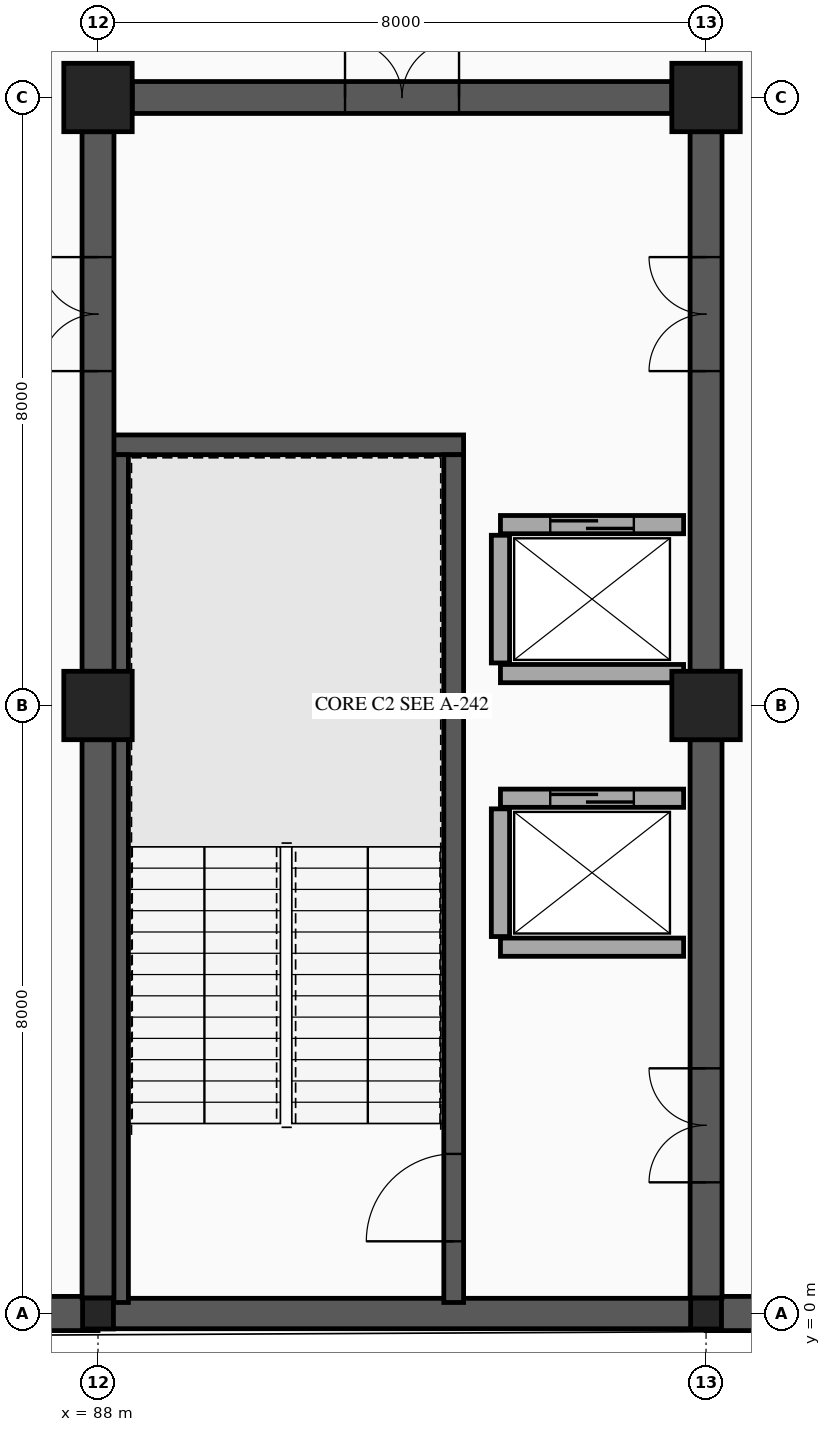
"""IFC4 building model, lengths in metres.
Left out: names, types, materials, properties, quantities, classifications, styles, units other than length and angle.
Written with IfcOpenShell. Run it as: python <this file> out.ifc"""

import sys

from ifc_helpers import new_model, si_unit, direction, frame, frame_2d, origin, origin_2d, place, context, subcontext, project, spatial, rectangle, hollow_rectangle, extrude, element, fill, save


model = new_model("IFC4")
c1 = context("Model", 3, precision=1e-05, world=origin(), true_north=direction((0.0, 1.0)))
c2 = subcontext(c1, "Body", "Model", "MODEL_VIEW")
j1 = project(units=[si_unit("LENGTHUNIT", "METRE"), si_unit("PLANEANGLEUNIT", "RADIAN")], contexts=[c1])
p1 = place(None, origin())
s1 = spatial("IfcSite", under=j1, at=p1, CompositionType="ELEMENT")
p2 = place(p1, origin())
s2 = spatial("IfcBuilding", under=s1, at=p2, CompositionType="ELEMENT")
p3 = place(p2, frame((0.0, 0.0, -4.8)))
s3 = spatial("IfcBuildingStorey", under=s2, at=p3, CompositionType="ELEMENT", Elevation=-4.8)
p4 = place(p3, frame((88.0, 0.0, 0.0), z_axis=(0.0, 0.0, 1.0), x_axis=(1.0, 0.0, 0.0)))
e1 = element("IfcColumn", 1, at=p4, inside=s3, PredefinedType="COLUMN", context=c2, shape_type="SweptSolid", body=[
    extrude(hollow_rectangle(XDim=0.406, YDim=0.406, WallThickness=0.015, InnerFilletRadius=0.015, OuterFilletRadius=0.029, at=origin_2d()), origin(), (0.0, 0.0, 1.0), 4.8),
])
for number, where, z_axis, x_axis in (
    (2, (88.0, 8.0, 0.0), (0.0, 0.0, 1.0), (1.0, 0.0, 0.0)),
    (3, (88.0, 16.0, 0.0), (0.0, 0.0, 1.0), (1.0, 0.0, 0.0)),
):
    element("IfcColumn", number, at=place(p3, frame(where, z_axis=z_axis, x_axis=x_axis)), inside=s3, PredefinedType="COLUMN", context=c2, shape_type="SweptSolid", body=[
        extrude(rectangle(XDim=0.9, YDim=0.9, at=origin_2d()), origin(), (0.0, 0.0, 1.0), 4.8),
    ])
p5 = place(p3, frame((96.0, 0.0, 0.0), z_axis=(0.0, 0.0, 1.0), x_axis=(1.0, 0.0, 0.0)))
e4 = element("IfcColumn", 4, at=p5, inside=s3, PredefinedType="COLUMN", context=c2, shape_type="SweptSolid", body=[
    extrude(hollow_rectangle(XDim=0.406, YDim=0.406, WallThickness=0.015, InnerFilletRadius=0.015, OuterFilletRadius=0.029, at=origin_2d()), origin(), (0.0, 0.0, 1.0), 4.8),
])
for number, where, z_axis, x_axis in (
    (5, (96.0, 8.0, 0.0), (0.0, 0.0, 1.0), (1.0, 0.0, 0.0)),
    (6, (96.0, 16.0, 0.0), (0.0, 0.0, 1.0), (1.0, 0.0, 0.0)),
):
    element("IfcColumn", number, at=place(p3, frame(where, z_axis=z_axis, x_axis=x_axis)), inside=s3, PredefinedType="COLUMN", context=c2, shape_type="SweptSolid", body=[
        extrude(rectangle(XDim=0.9, YDim=0.9, at=origin_2d()), origin(), (0.0, 0.0, 1.0), 4.8),
    ])
p6 = place(p3, frame((104.0, 0.0, 0.0), z_axis=(0.0, 0.0, 1.0), x_axis=(-1.0, 0.0, 0.0)))
e7 = element("IfcWall", 7, at=p6, inside=s3, PredefinedType="USERDEFINED", context=c2, shape_type="SweptSolid", body=[
    extrude(rectangle(XDim=8.0, YDim=0.45, at=frame_2d((4.0, 0.0))), origin(), (0.0, 0.0, 1.0), 4.5),
])
p7 = place(p3, frame((96.0, 0.0, 0.0), z_axis=(0.0, 0.0, 1.0), x_axis=(-1.0, 0.0, 0.0)))
e8 = element("IfcWall", 8, at=p7, inside=s3, PredefinedType="USERDEFINED", context=c2, shape_type="SweptSolid", body=[
    extrude(rectangle(XDim=8.0, YDim=0.4, at=frame_2d((4.0, 0.0))), origin(), (0.0, 0.0, 1.0), 4.5),
])
p8 = place(p3, frame((88.0, 0.0, 0.0), z_axis=(0.0, 0.0, 1.0), x_axis=(-1.0, 0.0, 0.0)))
e9 = element("IfcWall", 9, at=p8, inside=s3, PredefinedType="USERDEFINED", context=c2, shape_type="SweptSolid", body=[
    extrude(rectangle(XDim=8.0, YDim=0.45, at=frame_2d((4.0, 0.0))), origin(), (0.0, 0.0, 1.0), 4.5),
])
p9 = place(p3, frame((88.14, 11.43, 0.0), z_axis=(0.0, 0.0, 1.0), x_axis=(1.0, 0.0, 0.0)))
e10 = element("IfcWall", 10, at=p9, inside=s3, PredefinedType="SHEAR", context=c2, shape_type="SweptSolid", body=[
    extrude(rectangle(XDim=4.67, YDim=0.26, at=frame_2d((2.335, 0.0))), origin(), (0.0, 0.0, 1.0), 4.58),
])
p10 = place(p3, frame((88.27, 0.145, 0.0), z_axis=(0.0, 0.0, 1.0), x_axis=(0.0, 1.0, 0.0)))
e11 = element("IfcWall", 11, at=p10, inside=s3, PredefinedType="SHEAR", context=c2, shape_type="SweptSolid", body=[
    extrude(rectangle(XDim=11.155, YDim=0.26, at=frame_2d((5.578, 0.0))), origin(), (0.0, 0.0, 1.0), 4.58),
])
p11 = place(p3, frame((92.68, 0.145, 0.0), z_axis=(0.0, 0.0, 1.0), x_axis=(0.0, 1.0, 0.0)))
e12 = element("IfcWall", 12, at=p11, inside=s3, PredefinedType="SHEAR", context=c2, shape_type="SweptSolid", body=[
    extrude(rectangle(XDim=11.155, YDim=0.26, at=frame_2d((5.578, 0.0))), origin(), (0.0, 0.0, 1.0), 4.58),
])
p12 = place(p11, frame((0.805, 0.0, 0.0)))
e13 = element("IfcOpeningElement", 13, at=p12, cuts=e12, PredefinedType="OPENING", context=c2, shape_type="SweptSolid", body=[
    extrude(rectangle(XDim=1.15, YDim=2.15, at=frame_2d((0.575, 1.075))), frame((0.0, 0.14, 0.0), z_axis=(0.0, -1.0, 0.0), x_axis=(1.0, 0.0, 0.0)), (0.0, 0.0, 1.0), 0.28),
])
p13 = place(p3, frame((88.45, 16.0, 0.0), z_axis=(0.0, 0.0, 1.0), x_axis=(1.0, 0.0, 0.0)))
e14 = element("IfcWall", 14, at=p13, inside=s3, PredefinedType="SHEAR", context=c2, shape_type="SweptSolid", body=[
    extrude(rectangle(XDim=7.1, YDim=0.42, at=frame_2d((3.55, 0.0))), origin(), (0.0, 0.0, 1.0), 4.58),
])
p14 = place(p13, frame((2.8, 0.0, 0.0)))
e15 = element("IfcOpeningElement", 15, at=p14, cuts=e14, PredefinedType="OPENING", context=c2, shape_type="SweptSolid", body=[
    extrude(rectangle(XDim=1.5, YDim=2.15, at=frame_2d((0.75, 1.075))), frame((0.0, 0.22, 0.0), z_axis=(0.0, -1.0, 0.0), x_axis=(1.0, 0.0, 0.0)), (0.0, 0.0, 1.0), 0.44),
])
p15 = place(p3, frame((88.0, 0.203, 0.0), z_axis=(0.0, 0.0, 1.0), x_axis=(0.0, 1.0, 0.0)))
e16 = element("IfcWall", 16, at=p15, inside=s3, PredefinedType="SHEAR", context=c2, shape_type="SweptSolid", body=[
    extrude(rectangle(XDim=7.347, YDim=0.42, at=frame_2d((3.674, 0.0))), origin(), (0.0, 0.0, 1.0), 4.58),
])
p16 = place(p3, frame((88.0, 8.45, 0.0), z_axis=(0.0, 0.0, 1.0), x_axis=(0.0, 1.0, 0.0)))
e17 = element("IfcWall", 17, at=p16, inside=s3, PredefinedType="SHEAR", context=c2, shape_type="SweptSolid", body=[
    extrude(rectangle(XDim=7.1, YDim=0.42, at=frame_2d((3.55, 0.0))), origin(), (0.0, 0.0, 1.0), 4.58),
])
p17 = place(p16, frame((3.95, 0.0, 0.0)))
e18 = element("IfcOpeningElement", 18, at=p17, cuts=e17, PredefinedType="OPENING", context=c2, shape_type="SweptSolid", body=[
    extrude(rectangle(XDim=1.5, YDim=2.15, at=frame_2d((0.75, 1.075))), frame((0.0, 0.22, 0.0), z_axis=(0.0, -1.0, 0.0), x_axis=(1.0, 0.0, 0.0)), (0.0, 0.0, 1.0), 0.44),
])
p18 = place(p3, frame((96.0, 0.203, 0.0), z_axis=(0.0, 0.0, 1.0), x_axis=(0.0, 1.0, 0.0)))
e19 = element("IfcWall", 19, at=p18, inside=s3, PredefinedType="SHEAR", context=c2, shape_type="SweptSolid", body=[
    extrude(rectangle(XDim=7.347, YDim=0.42, at=frame_2d((3.674, 0.0))), origin(), (0.0, 0.0, 1.0), 4.58),
])
p19 = place(p18, frame((1.523, 0.0, 0.0)))
e20 = element("IfcOpeningElement", 20, at=p19, cuts=e19, PredefinedType="OPENING", context=c2, shape_type="SweptSolid", body=[
    extrude(rectangle(XDim=1.5, YDim=2.15, at=frame_2d((0.75, 1.075))), frame((0.0, 0.22, 0.0), z_axis=(0.0, -1.0, 0.0), x_axis=(1.0, 0.0, 0.0)), (0.0, 0.0, 1.0), 0.44),
])
p20 = place(p3, frame((96.0, 8.45, 0.0), z_axis=(0.0, 0.0, 1.0), x_axis=(0.0, 1.0, 0.0)))
e21 = element("IfcWall", 21, at=p20, inside=s3, PredefinedType="SHEAR", context=c2, shape_type="SweptSolid", body=[
    extrude(rectangle(XDim=7.1, YDim=0.42, at=frame_2d((3.55, 0.0))), origin(), (0.0, 0.0, 1.0), 4.58),
])
p21 = place(p20, frame((3.95, 0.0, 0.0)))
e22 = element("IfcOpeningElement", 22, at=p21, cuts=e21, PredefinedType="OPENING", context=c2, shape_type="SweptSolid", body=[
    extrude(rectangle(XDim=1.5, YDim=2.15, at=frame_2d((0.75, 1.075))), frame((0.0, 0.22, 0.0), z_axis=(0.0, -1.0, 0.0), x_axis=(1.0, 0.0, 0.0)), (0.0, 0.0, 1.0), 0.44),
])
p22 = place(p3, frame((93.295, 6.78, 0.0), z_axis=(0.0, 0.0, 1.0), x_axis=(1.0, 0.0, 0.0)))
e23 = element("IfcWall", 23, at=p22, inside=s3, PredefinedType="PARTITIONING", context=c2, shape_type="SweptSolid", body=[
    extrude(rectangle(XDim=2.41, YDim=0.24, at=frame_2d((1.205, 0.0))), origin(), (0.0, 0.0, 1.0), 4.58),
])
p23 = place(p22, frame((0.655, 0.0, 0.0)))
e24 = element("IfcOpeningElement", 24, at=p23, cuts=e23, PredefinedType="OPENING", context=c2, shape_type="SweptSolid", body=[
    extrude(rectangle(XDim=1.1, YDim=2.15, at=frame_2d((0.55, 1.075))), frame((0.0, 0.13, 0.0), z_axis=(0.0, -1.0, 0.0), x_axis=(1.0, 0.0, 0.0)), (0.0, 0.0, 1.0), 0.26),
])
p24 = place(p3, frame((93.295, 4.82, 0.0), z_axis=(0.0, 0.0, 1.0), x_axis=(1.0, 0.0, 0.0)))
e25 = element("IfcWall", 25, at=p24, inside=s3, PredefinedType="PARTITIONING", context=c2, shape_type="SweptSolid", body=[
    extrude(rectangle(XDim=2.41, YDim=0.24, at=frame_2d((1.205, 0.0))), origin(), (0.0, 0.0, 1.0), 4.58),
])
p25 = place(p3, frame((93.295, 4.96, 0.0), z_axis=(0.0, 0.0, 1.0), x_axis=(0.0, 1.0, 0.0)))
e26 = element("IfcWall", 26, at=p25, inside=s3, PredefinedType="PARTITIONING", context=c2, shape_type="SweptSolid", body=[
    extrude(rectangle(XDim=1.68, YDim=0.24, at=frame_2d((0.84, 0.0))), origin(), (0.0, 0.0, 1.0), 4.58),
])
p26 = place(p3, frame((93.295, 10.38, 0.0), z_axis=(0.0, 0.0, 1.0), x_axis=(1.0, 0.0, 0.0)))
e27 = element("IfcWall", 27, at=p26, inside=s3, PredefinedType="PARTITIONING", context=c2, shape_type="SweptSolid", body=[
    extrude(rectangle(XDim=2.41, YDim=0.24, at=frame_2d((1.205, 0.0))), origin(), (0.0, 0.0, 1.0), 4.58),
])
p27 = place(p26, frame((0.655, 0.0, 0.0)))
e28 = element("IfcOpeningElement", 28, at=p27, cuts=e27, PredefinedType="OPENING", context=c2, shape_type="SweptSolid", body=[
    extrude(rectangle(XDim=1.1, YDim=2.15, at=frame_2d((0.55, 1.075))), frame((0.0, 0.13, 0.0), z_axis=(0.0, -1.0, 0.0), x_axis=(1.0, 0.0, 0.0)), (0.0, 0.0, 1.0), 0.26),
])
p28 = place(p3, frame((93.295, 8.42, 0.0), z_axis=(0.0, 0.0, 1.0), x_axis=(1.0, 0.0, 0.0)))
e29 = element("IfcWall", 29, at=p28, inside=s3, PredefinedType="PARTITIONING", context=c2, shape_type="SweptSolid", body=[
    extrude(rectangle(XDim=2.41, YDim=0.24, at=frame_2d((1.205, 0.0))), origin(), (0.0, 0.0, 1.0), 4.58),
])
p29 = place(p3, frame((93.295, 8.56, 0.0), z_axis=(0.0, 0.0, 1.0), x_axis=(0.0, 1.0, 0.0)))
e30 = element("IfcWall", 30, at=p29, inside=s3, PredefinedType="PARTITIONING", context=c2, shape_type="SweptSolid", body=[
    extrude(rectangle(XDim=1.68, YDim=0.24, at=frame_2d((0.84, 0.0))), origin(), (0.0, 0.0, 1.0), 4.58),
])
p30 = place(p12, origin())
e31 = element("IfcDoor", 31, at=p30, inside=s3, OperationType="SINGLE_SWING_LEFT", PredefinedType="DOOR", context=c2, shape_type="SweptSolid", body=[
    extrude(rectangle(XDim=1.15, YDim=2.15, at=frame_2d((0.575, 1.075))), frame((0.0, 0.025, 0.0), z_axis=(0.0, -1.0, 0.0), x_axis=(1.0, 0.0, 0.0)), (0.0, 0.0, 1.0), 0.05),
])
fill(e13, e31)
p31 = place(p14, origin())
e32 = element("IfcDoor", 32, at=p31, inside=s3, OperationType="DOUBLE_DOOR_SINGLE_SWING", PredefinedType="DOOR", context=c2, shape_type="SweptSolid", body=[
    extrude(rectangle(XDim=1.5, YDim=2.15, at=frame_2d((0.75, 1.075))), frame((0.0, 0.025, 0.0), z_axis=(0.0, -1.0, 0.0), x_axis=(1.0, 0.0, 0.0)), (0.0, 0.0, 1.0), 0.05),
])
fill(e15, e32)
p32 = place(p17, origin())
e33 = element("IfcDoor", 33, at=p32, inside=s3, OperationType="DOUBLE_DOOR_SINGLE_SWING", PredefinedType="DOOR", context=c2, shape_type="SweptSolid", body=[
    extrude(rectangle(XDim=1.5, YDim=2.15, at=frame_2d((0.75, 1.075))), frame((0.0, 0.025, 0.0), z_axis=(0.0, -1.0, 0.0), x_axis=(1.0, 0.0, 0.0)), (0.0, 0.0, 1.0), 0.05),
])
fill(e18, e33)
p33 = place(p19, origin())
e34 = element("IfcDoor", 34, at=p33, inside=s3, OperationType="DOUBLE_DOOR_SINGLE_SWING", PredefinedType="DOOR", context=c2, shape_type="SweptSolid", body=[
    extrude(rectangle(XDim=1.5, YDim=2.15, at=frame_2d((0.75, 1.075))), frame((0.0, 0.025, 0.0), z_axis=(0.0, -1.0, 0.0), x_axis=(1.0, 0.0, 0.0)), (0.0, 0.0, 1.0), 0.05),
])
fill(e20, e34)
p34 = place(p21, origin())
e35 = element("IfcDoor", 35, at=p34, inside=s3, OperationType="DOUBLE_DOOR_SINGLE_SWING", PredefinedType="DOOR", context=c2, shape_type="SweptSolid", body=[
    extrude(rectangle(XDim=1.5, YDim=2.15, at=frame_2d((0.75, 1.075))), frame((0.0, 0.025, 0.0), z_axis=(0.0, -1.0, 0.0), x_axis=(1.0, 0.0, 0.0)), (0.0, 0.0, 1.0), 0.05),
])
fill(e22, e35)
p35 = place(p23, origin())
e36 = element("IfcDoor", 36, at=p35, inside=s3, OperationType="SLIDING_TO_LEFT", PredefinedType="DOOR", context=c2, shape_type="SweptSolid", body=[
    extrude(rectangle(XDim=1.1, YDim=2.15, at=frame_2d((0.55, 1.075))), frame((0.0, 0.025, 0.0), z_axis=(0.0, -1.0, 0.0), x_axis=(1.0, 0.0, 0.0)), (0.0, 0.0, 1.0), 0.05),
])
fill(e24, e36)
p36 = place(p27, origin())
e37 = element("IfcDoor", 37, at=p36, inside=s3, OperationType="SLIDING_TO_LEFT", PredefinedType="DOOR", context=c2, shape_type="SweptSolid", body=[
    extrude(rectangle(XDim=1.1, YDim=2.15, at=frame_2d((0.55, 1.075))), frame((0.0, 0.025, 0.0), z_axis=(0.0, -1.0, 0.0), x_axis=(1.0, 0.0, 0.0)), (0.0, 0.0, 1.0), 0.05),
])
fill(e28, e37)
save(model, sys.argv[1])
